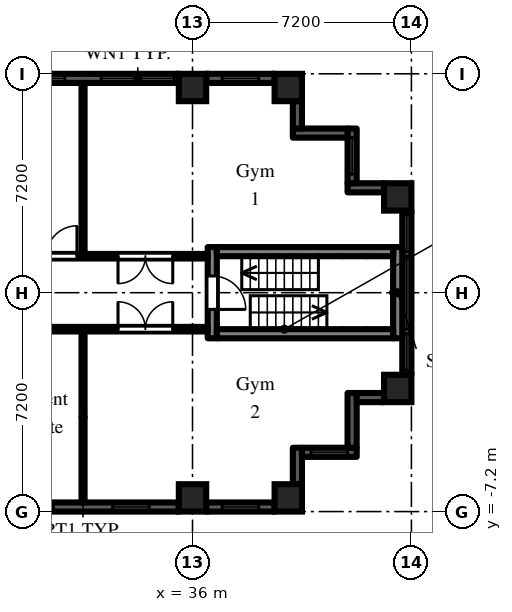
"""IFC4 building model, lengths in metres.
Left out: names, types, materials, properties, quantities, classifications, styles, units other than length and angle.
Written with IfcOpenShell. Run it as: python <this file> out.ifc"""

import sys

from ifc_helpers import new_model, si_unit, direction, frame, frame_2d, origin, origin_2d, place, context, subcontext, project, spatial, rectangle, extrude, element, fill, save


model = new_model("IFC4")
c1 = context("Model", 3, precision=1e-05, world=origin(), true_north=direction((0.0, 1.0)))
c2 = subcontext(c1, "Body", "Model", "MODEL_VIEW")
j1 = project(units=[si_unit("LENGTHUNIT", "METRE"), si_unit("PLANEANGLEUNIT", "RADIAN")], contexts=[c1])
p1 = place(None, origin())
s1 = spatial("IfcSite", under=j1, at=p1, CompositionType="ELEMENT")
p2 = place(p1, origin())
s2 = spatial("IfcBuilding", under=s1, at=p2, CompositionType="ELEMENT")
p3 = place(p2, frame((0.0, 0.0, 29.7)))
s3 = spatial("IfcBuildingStorey", under=s2, at=p3, CompositionType="ELEMENT", Elevation=29.7)
for number, where, z_axis, x_axis in (
    (1, (36.0, -6.75, 0.0), (0.0, 0.0, 1.0), (1.0, 0.0, 0.0)),
    (2, (36.0, 6.75, 0.0), (0.0, 0.0, 1.0), (1.0, 0.0, 0.0)),
    (3, (39.15, -6.75, 0.0), (0.0, 0.0, 1.0), (1.0, 0.0, 0.0)),
    (4, (39.15, 6.75, 0.0), (0.0, 0.0, 1.0), (1.0, 0.0, 0.0)),
    (5, (42.75, -3.15, 0.0), (0.0, 0.0, 1.0), (1.0, 0.0, 0.0)),
    (6, (42.75, 3.15, 0.0), (0.0, 0.0, 1.0), (1.0, 0.0, 0.0)),
):
    element("IfcColumn", number, at=place(p3, frame(where, z_axis=z_axis, x_axis=x_axis)), inside=s3, PredefinedType="COLUMN", context=c2, shape_type="SweptSolid", body=[
        extrude(rectangle(XDim=0.9, YDim=0.9, at=origin_2d()), origin(), (0.0, 0.0, 1.0), 3.0),
    ])
p4 = place(p3, frame((29.25, -7.05, 0.0), z_axis=(0.0, 0.0, 1.0), x_axis=(1.0, 0.0, 0.0)))
e7 = element("IfcWall", 7, at=p4, inside=s3, PredefinedType="SOLIDWALL", context=c2, shape_type="SweptSolid", body=[
    extrude(rectangle(XDim=6.3, YDim=0.3, at=frame_2d((3.15, 0.0))), origin(), (0.0, 0.0, 1.0), 2.1),
])
p5 = place(p4, frame((0.975, 0.0, 0.2)))
e8 = element("IfcOpeningElement", 8, at=p5, cuts=e7, PredefinedType="OPENING", context=c2, shape_type="SweptSolid", body=[
    extrude(rectangle(XDim=1.2, YDim=1.85, at=frame_2d((0.6, 0.925))), frame((0.0, 0.16, 0.0), z_axis=(0.0, -1.0, 0.0), x_axis=(1.0, 0.0, 0.0)), (0.0, 0.0, 1.0), 0.32),
])
p6 = place(p4, frame((4.125, 0.0, 0.2)))
e9 = element("IfcOpeningElement", 9, at=p6, cuts=e7, PredefinedType="OPENING", context=c2, shape_type="SweptSolid", body=[
    extrude(rectangle(XDim=1.2, YDim=1.85, at=frame_2d((0.6, 0.925))), frame((0.0, 0.16, 0.0), z_axis=(0.0, -1.0, 0.0), x_axis=(1.0, 0.0, 0.0)), (0.0, 0.0, 1.0), 0.32),
])
p7 = place(p3, frame((36.45, -7.05, 0.0), z_axis=(0.0, 0.0, 1.0), x_axis=(1.0, 0.0, 0.0)))
e10 = element("IfcWall", 10, at=p7, inside=s3, PredefinedType="SOLIDWALL", context=c2, shape_type="SweptSolid", body=[
    extrude(rectangle(XDim=2.25, YDim=0.3, at=frame_2d((1.125, 0.0))), origin(), (0.0, 0.0, 1.0), 2.1),
])
p8 = place(p7, frame((0.525, 0.0, 0.2)))
e11 = element("IfcOpeningElement", 11, at=p8, cuts=e10, PredefinedType="OPENING", context=c2, shape_type="SweptSolid", body=[
    extrude(rectangle(XDim=1.2, YDim=1.85, at=frame_2d((0.6, 0.925))), frame((0.0, 0.16, 0.0), z_axis=(0.0, -1.0, 0.0), x_axis=(1.0, 0.0, 0.0)), (0.0, 0.0, 1.0), 0.32),
])
p9 = place(p3, frame((39.45, -6.3, 0.0), z_axis=(0.0, 0.0, 1.0), x_axis=(0.0, 1.0, 0.0)))
e12 = element("IfcWall", 12, at=p9, inside=s3, PredefinedType="SOLIDWALL", context=c2, shape_type="SweptSolid", body=[
    extrude(rectangle(XDim=1.2, YDim=0.3, at=frame_2d((0.6, 0.0))), origin(), (0.0, 0.0, 1.0), 2.575),
])
p10 = place(p3, frame((39.6, -5.25, 0.0), z_axis=(0.0, 0.0, 1.0), x_axis=(1.0, 0.0, 0.0)))
e13 = element("IfcWall", 13, at=p10, inside=s3, PredefinedType="SOLIDWALL", context=c2, shape_type="SweptSolid", body=[
    extrude(rectangle(XDim=1.8, YDim=0.3, at=frame_2d((0.9, 0.0))), origin(), (0.0, 0.0, 1.0), 2.575),
])
p11 = place(p10, frame((0.3, 0.0, 0.2)))
e14 = element("IfcOpeningElement", 14, at=p11, cuts=e13, PredefinedType="OPENING", context=c2, shape_type="SweptSolid", body=[
    extrude(rectangle(XDim=1.2, YDim=1.85, at=frame_2d((0.6, 0.925))), frame((0.0, 0.16, 0.0), z_axis=(0.0, -1.0, 0.0), x_axis=(1.0, 0.0, 0.0)), (0.0, 0.0, 1.0), 0.32),
])
p12 = place(p3, frame((41.25, -5.1, 0.0), z_axis=(0.0, 0.0, 1.0), x_axis=(0.0, 1.0, 0.0)))
e15 = element("IfcWall", 15, at=p12, inside=s3, PredefinedType="SOLIDWALL", context=c2, shape_type="SweptSolid", body=[
    extrude(rectangle(XDim=1.8, YDim=0.3, at=frame_2d((0.9, 0.0))), origin(), (0.0, 0.0, 1.0), 2.575),
])
p13 = place(p3, frame((41.4, -3.45, 0.0), z_axis=(0.0, 0.0, 1.0), x_axis=(1.0, 0.0, 0.0)))
e16 = element("IfcWall", 16, at=p13, inside=s3, PredefinedType="SOLIDWALL", context=c2, shape_type="SweptSolid", body=[
    extrude(rectangle(XDim=0.9, YDim=0.3, at=frame_2d((0.45, 0.0))), origin(), (0.0, 0.0, 1.0), 2.575),
])
p14 = place(p3, frame((43.05, -2.7, 0.0), z_axis=(0.0, 0.0, 1.0), x_axis=(0.0, 1.0, 0.0)))
e17 = element("IfcWall", 17, at=p14, inside=s3, PredefinedType="SOLIDWALL", context=c2, shape_type="SweptSolid", body=[
    extrude(rectangle(XDim=5.4, YDim=0.3, at=frame_2d((2.7, 0.0))), origin(), (0.0, 0.0, 1.0), 2.1),
])
p15 = place(p14, frame((1.5, 0.0, 0.2)))
e18 = element("IfcOpeningElement", 18, at=p15, cuts=e17, PredefinedType="OPENING", context=c2, shape_type="SweptSolid", body=[
    extrude(rectangle(XDim=2.4, YDim=1.85, at=frame_2d((1.2, 0.925))), frame((0.0, 0.16, 0.0), z_axis=(0.0, -1.0, 0.0), x_axis=(1.0, 0.0, 0.0)), (0.0, 0.0, 1.0), 0.32),
])
p16 = place(p14, frame((0.15, 0.0, 0.2)))
e19 = element("IfcOpeningElement", 19, at=p16, cuts=e17, PredefinedType="OPENING", context=c2, shape_type="SweptSolid", body=[
    extrude(rectangle(XDim=1.2, YDim=1.85, at=frame_2d((0.6, 0.925))), frame((0.0, 0.16, 0.0), z_axis=(0.0, -1.0, 0.0), x_axis=(1.0, 0.0, 0.0)), (0.0, 0.0, 1.0), 0.32),
])
p17 = place(p14, frame((4.05, 0.0, 0.2)))
e20 = element("IfcOpeningElement", 20, at=p17, cuts=e17, PredefinedType="OPENING", context=c2, shape_type="SweptSolid", body=[
    extrude(rectangle(XDim=1.2, YDim=1.85, at=frame_2d((0.6, 0.925))), frame((0.0, 0.16, 0.0), z_axis=(0.0, -1.0, 0.0), x_axis=(1.0, 0.0, 0.0)), (0.0, 0.0, 1.0), 0.32),
])
p18 = place(p3, frame((42.3, 3.45, 0.0), z_axis=(0.0, 0.0, 1.0), x_axis=(-1.0, 0.0, 0.0)))
e21 = element("IfcWall", 21, at=p18, inside=s3, PredefinedType="SOLIDWALL", context=c2, shape_type="SweptSolid", body=[
    extrude(rectangle(XDim=1.2, YDim=0.3, at=frame_2d((0.6, 0.0))), origin(), (0.0, 0.0, 1.0), 2.575),
])
p19 = place(p3, frame((41.25, 3.6, 0.0), z_axis=(0.0, 0.0, 1.0), x_axis=(0.0, 1.0, 0.0)))
e22 = element("IfcWall", 22, at=p19, inside=s3, PredefinedType="SOLIDWALL", context=c2, shape_type="SweptSolid", body=[
    extrude(rectangle(XDim=1.8, YDim=0.3, at=frame_2d((0.9, 0.0))), origin(), (0.0, 0.0, 1.0), 2.575),
])
p20 = place(p19, frame((0.3, 0.0, 0.2)))
e23 = element("IfcOpeningElement", 23, at=p20, cuts=e22, PredefinedType="OPENING", context=c2, shape_type="SweptSolid", body=[
    extrude(rectangle(XDim=1.2, YDim=1.85, at=frame_2d((0.6, 0.925))), frame((0.0, 0.16, 0.0), z_axis=(0.0, -1.0, 0.0), x_axis=(1.0, 0.0, 0.0)), (0.0, 0.0, 1.0), 0.32),
])
p21 = place(p3, frame((41.1, 5.25, 0.0), z_axis=(0.0, 0.0, 1.0), x_axis=(-1.0, 0.0, 0.0)))
e24 = element("IfcWall", 24, at=p21, inside=s3, PredefinedType="SOLIDWALL", context=c2, shape_type="SweptSolid", body=[
    extrude(rectangle(XDim=1.8, YDim=0.3, at=frame_2d((0.9, 0.0))), origin(), (0.0, 0.0, 1.0), 2.575),
])
p22 = place(p3, frame((39.45, 5.4, 0.0), z_axis=(0.0, 0.0, 1.0), x_axis=(0.0, 1.0, 0.0)))
e25 = element("IfcWall", 25, at=p22, inside=s3, PredefinedType="SOLIDWALL", context=c2, shape_type="SweptSolid", body=[
    extrude(rectangle(XDim=0.9, YDim=0.3, at=frame_2d((0.45, 0.0))), origin(), (0.0, 0.0, 1.0), 2.575),
])
p23 = place(p3, frame((38.7, 7.05, 0.0), z_axis=(0.0, 0.0, 1.0), x_axis=(-1.0, 0.0, 0.0)))
e26 = element("IfcWall", 26, at=p23, inside=s3, PredefinedType="SOLIDWALL", context=c2, shape_type="SweptSolid", body=[
    extrude(rectangle(XDim=2.25, YDim=0.3, at=frame_2d((1.125, 0.0))), origin(), (0.0, 0.0, 1.0), 2.1),
])
p24 = place(p23, frame((0.525, 0.0, 0.2)))
e27 = element("IfcOpeningElement", 27, at=p24, cuts=e26, PredefinedType="OPENING", context=c2, shape_type="SweptSolid", body=[
    extrude(rectangle(XDim=1.2, YDim=1.85, at=frame_2d((0.6, 0.925))), frame((0.0, 0.16, 0.0), z_axis=(0.0, -1.0, 0.0), x_axis=(1.0, 0.0, 0.0)), (0.0, 0.0, 1.0), 0.32),
])
p25 = place(p3, frame((35.55, 7.05, 0.0), z_axis=(0.0, 0.0, 1.0), x_axis=(-1.0, 0.0, 0.0)))
e28 = element("IfcWall", 28, at=p25, inside=s3, PredefinedType="SOLIDWALL", context=c2, shape_type="SweptSolid", body=[
    extrude(rectangle(XDim=6.3, YDim=0.3, at=frame_2d((3.15, 0.0))), origin(), (0.0, 0.0, 1.0), 2.1),
])
p26 = place(p25, frame((0.15, 0.0, 0.2)))
e29 = element("IfcOpeningElement", 29, at=p26, cuts=e28, PredefinedType="OPENING", context=c2, shape_type="SweptSolid", body=[
    extrude(rectangle(XDim=2.4, YDim=1.85, at=frame_2d((1.2, 0.925))), frame((0.0, 0.16, 0.0), z_axis=(0.0, -1.0, 0.0), x_axis=(1.0, 0.0, 0.0)), (0.0, 0.0, 1.0), 0.32),
])
p27 = place(p25, frame((3.75, 0.0, 0.2)))
e30 = element("IfcOpeningElement", 30, at=p27, cuts=e28, PredefinedType="OPENING", context=c2, shape_type="SweptSolid", body=[
    extrude(rectangle(XDim=2.4, YDim=1.85, at=frame_2d((1.2, 0.925))), frame((0.0, 0.16, 0.0), z_axis=(0.0, -1.0, 0.0), x_axis=(1.0, 0.0, 0.0)), (0.0, 0.0, 1.0), 0.32),
])
p28 = place(p3, frame((36.65, -1.5, 0.0), z_axis=(0.0, 0.0, 1.0), x_axis=(0.0, 1.0, 0.0)))
e31 = element("IfcWall", 31, at=p28, inside=s3, PredefinedType="SHEAR", context=c2, shape_type="SweptSolid", body=[
    extrude(rectangle(XDim=3.0, YDim=0.3, at=frame_2d((1.5, 0.0))), origin(), (0.0, 0.0, 1.0), 2.575),
])
p29 = place(p28, frame((0.95, 0.0, 0.0)))
e32 = element("IfcOpeningElement", 32, at=p29, cuts=e31, PredefinedType="OPENING", context=c2, shape_type="SweptSolid", body=[
    extrude(rectangle(XDim=1.1, YDim=2.1, at=frame_2d((0.55, 1.05))), frame((0.0, 0.16, 0.0), z_axis=(0.0, -1.0, 0.0), x_axis=(1.0, 0.0, 0.0)), (0.0, 0.0, 1.0), 0.32),
])
p30 = place(p3, frame((42.75, -1.5, 0.0), z_axis=(0.0, 0.0, 1.0), x_axis=(0.0, 1.0, 0.0)))
e33 = element("IfcWall", 33, at=p30, inside=s3, PredefinedType="SHEAR", context=c2, shape_type="SweptSolid", body=[
    extrude(rectangle(XDim=3.0, YDim=0.3, at=frame_2d((1.5, 0.0))), origin(), (0.0, 0.0, 1.0), 2.575),
])
for number, where, z_axis, x_axis in (
    (34, (36.8, -1.35, 0.0), (0.0, 0.0, 1.0), (1.0, 0.0, 0.0)),
    (35, (36.8, 1.35, 0.0), (0.0, 0.0, 1.0), (1.0, 0.0, 0.0)),
):
    element("IfcWall", number, at=place(p3, frame(where, z_axis=z_axis, x_axis=x_axis)), inside=s3, PredefinedType="SHEAR", context=c2, shape_type="SweptSolid", body=[
        extrude(rectangle(XDim=5.8, YDim=0.3, at=frame_2d((2.9, 0.0))), origin(), (0.0, 0.0, 1.0), 2.575),
    ])
p31 = place(p3, frame((21.6, -1.2, 0.0), z_axis=(0.0, 0.0, 1.0), x_axis=(1.0, 0.0, 0.0)))
e36 = element("IfcWall", 36, at=p31, inside=s3, PredefinedType="PARTITIONING", context=c2, shape_type="SweptSolid", body=[
    extrude(rectangle(XDim=14.9, YDim=0.15, at=frame_2d((7.45, 0.0))), origin(), (0.0, 0.0, 1.0), 2.575),
])
p32 = place(p31, frame((1.35, 0.0, 0.0)))
e37 = element("IfcOpeningElement", 37, at=p32, cuts=e36, PredefinedType="OPENING", context=c2, shape_type="SweptSolid", body=[
    extrude(rectangle(XDim=0.9, YDim=2.1, at=frame_2d((0.45, 1.05))), frame((0.0, 0.085, 0.0), z_axis=(0.0, -1.0, 0.0), x_axis=(1.0, 0.0, 0.0)), (0.0, 0.0, 1.0), 0.17),
])
p33 = place(p31, frame((5.71, 0.0, 0.0)))
e38 = element("IfcOpeningElement", 38, at=p33, cuts=e36, PredefinedType="OPENING", context=c2, shape_type="SweptSolid", body=[
    extrude(rectangle(XDim=1.0, YDim=2.1, at=frame_2d((0.5, 1.05))), frame((0.0, 0.085, 0.0), z_axis=(0.0, -1.0, 0.0), x_axis=(1.0, 0.0, 0.0)), (0.0, 0.0, 1.0), 0.17),
])
p34 = place(p31, frame((11.95, 0.0, 0.0)))
e39 = element("IfcOpeningElement", 39, at=p34, cuts=e36, PredefinedType="OPENING", context=c2, shape_type="SweptSolid", body=[
    extrude(rectangle(XDim=1.8, YDim=2.1, at=frame_2d((0.9, 1.05))), frame((0.0, 0.085, 0.0), z_axis=(0.0, -1.0, 0.0), x_axis=(1.0, 0.0, 0.0)), (0.0, 0.0, 1.0), 0.17),
])
p35 = place(p3, frame((21.6, 1.2, 0.0), z_axis=(0.0, 0.0, 1.0), x_axis=(1.0, 0.0, 0.0)))
e40 = element("IfcWall", 40, at=p35, inside=s3, PredefinedType="PARTITIONING", context=c2, shape_type="SweptSolid", body=[
    extrude(rectangle(XDim=14.9, YDim=0.15, at=frame_2d((7.45, 0.0))), origin(), (0.0, 0.0, 1.0), 2.575),
])
p36 = place(p35, frame((6.0, 0.0, 0.0)))
e41 = element("IfcOpeningElement", 41, at=p36, cuts=e40, PredefinedType="OPENING", context=c2, shape_type="SweptSolid", body=[
    extrude(rectangle(XDim=1.0, YDim=2.1, at=frame_2d((0.5, 1.05))), frame((0.0, 0.085, 0.0), z_axis=(0.0, -1.0, 0.0), x_axis=(1.0, 0.0, 0.0)), (0.0, 0.0, 1.0), 0.17),
])
p37 = place(p35, frame((9.6, 0.0, 0.0)))
e42 = element("IfcOpeningElement", 42, at=p37, cuts=e40, PredefinedType="OPENING", context=c2, shape_type="SweptSolid", body=[
    extrude(rectangle(XDim=1.0, YDim=2.1, at=frame_2d((0.5, 1.05))), frame((0.0, 0.085, 0.0), z_axis=(0.0, -1.0, 0.0), x_axis=(1.0, 0.0, 0.0)), (0.0, 0.0, 1.0), 0.17),
])
p38 = place(p35, frame((11.95, 0.0, 0.0)))
e43 = element("IfcOpeningElement", 43, at=p38, cuts=e40, PredefinedType="OPENING", context=c2, shape_type="SweptSolid", body=[
    extrude(rectangle(XDim=1.8, YDim=2.1, at=frame_2d((0.9, 1.05))), frame((0.0, 0.085, 0.0), z_axis=(0.0, -1.0, 0.0), x_axis=(1.0, 0.0, 0.0)), (0.0, 0.0, 1.0), 0.17),
])
for number, where, z_axis, x_axis in (
    (44, (32.4, -6.9, 0.0), (0.0, 0.0, 1.0), (0.0, 1.0, 0.0)),
    (45, (32.4, 1.275, 0.0), (0.0, 0.0, 1.0), (0.0, 1.0, 0.0)),
):
    element("IfcWall", number, at=place(p3, frame(where, z_axis=z_axis, x_axis=x_axis)), inside=s3, PredefinedType="PARTITIONING", context=c2, shape_type="SweptSolid", body=[
        extrude(rectangle(XDim=5.625, YDim=0.1, at=frame_2d((2.812, 0.0))), origin(), (0.0, 0.0, 1.0), 2.575),
    ])
p39 = place(p5, origin())
e46 = element("IfcWindow", 46, at=p39, inside=s3, PartitioningType="SINGLE_PANEL", PredefinedType="WINDOW", context=c2, shape_type="SweptSolid", body=[
    extrude(rectangle(XDim=1.2, YDim=1.85, at=frame_2d((0.6, 0.925))), frame((0.0, 0.03, 0.0), z_axis=(0.0, -1.0, 0.0), x_axis=(1.0, 0.0, 0.0)), (0.0, 0.0, 1.0), 0.06),
])
fill(e8, e46)
p40 = place(p6, origin())
e47 = element("IfcWindow", 47, at=p40, inside=s3, PartitioningType="SINGLE_PANEL", PredefinedType="WINDOW", context=c2, shape_type="SweptSolid", body=[
    extrude(rectangle(XDim=1.2, YDim=1.85, at=frame_2d((0.6, 0.925))), frame((0.0, 0.03, 0.0), z_axis=(0.0, -1.0, 0.0), x_axis=(1.0, 0.0, 0.0)), (0.0, 0.0, 1.0), 0.06),
])
fill(e9, e47)
p41 = place(p8, origin())
e48 = element("IfcWindow", 48, at=p41, inside=s3, PartitioningType="SINGLE_PANEL", PredefinedType="WINDOW", context=c2, shape_type="SweptSolid", body=[
    extrude(rectangle(XDim=1.2, YDim=1.85, at=frame_2d((0.6, 0.925))), frame((0.0, 0.03, 0.0), z_axis=(0.0, -1.0, 0.0), x_axis=(1.0, 0.0, 0.0)), (0.0, 0.0, 1.0), 0.06),
])
fill(e11, e48)
p42 = place(p11, origin())
e49 = element("IfcWindow", 49, at=p42, inside=s3, PartitioningType="SINGLE_PANEL", PredefinedType="WINDOW", context=c2, shape_type="SweptSolid", body=[
    extrude(rectangle(XDim=1.2, YDim=1.85, at=frame_2d((0.6, 0.925))), frame((0.0, 0.03, 0.0), z_axis=(0.0, -1.0, 0.0), x_axis=(1.0, 0.0, 0.0)), (0.0, 0.0, 1.0), 0.06),
])
fill(e14, e49)
p43 = place(p15, origin())
e50 = element("IfcWindow", 50, at=p43, inside=s3, PartitioningType="SINGLE_PANEL", PredefinedType="WINDOW", context=c2, shape_type="SweptSolid", body=[
    extrude(rectangle(XDim=2.4, YDim=1.85, at=frame_2d((1.2, 0.925))), frame((0.0, 0.03, 0.0), z_axis=(0.0, -1.0, 0.0), x_axis=(1.0, 0.0, 0.0)), (0.0, 0.0, 1.0), 0.06),
])
fill(e18, e50)
p44 = place(p16, origin())
e51 = element("IfcWindow", 51, at=p44, inside=s3, PartitioningType="SINGLE_PANEL", PredefinedType="WINDOW", context=c2, shape_type="SweptSolid", body=[
    extrude(rectangle(XDim=1.2, YDim=1.85, at=frame_2d((0.6, 0.925))), frame((0.0, 0.03, 0.0), z_axis=(0.0, -1.0, 0.0), x_axis=(1.0, 0.0, 0.0)), (0.0, 0.0, 1.0), 0.06),
])
fill(e19, e51)
p45 = place(p17, origin())
e52 = element("IfcWindow", 52, at=p45, inside=s3, PartitioningType="SINGLE_PANEL", PredefinedType="WINDOW", context=c2, shape_type="SweptSolid", body=[
    extrude(rectangle(XDim=1.2, YDim=1.85, at=frame_2d((0.6, 0.925))), frame((0.0, 0.03, 0.0), z_axis=(0.0, -1.0, 0.0), x_axis=(1.0, 0.0, 0.0)), (0.0, 0.0, 1.0), 0.06),
])
fill(e20, e52)
p46 = place(p20, origin())
e53 = element("IfcWindow", 53, at=p46, inside=s3, PartitioningType="SINGLE_PANEL", PredefinedType="WINDOW", context=c2, shape_type="SweptSolid", body=[
    extrude(rectangle(XDim=1.2, YDim=1.85, at=frame_2d((0.6, 0.925))), frame((0.0, 0.03, 0.0), z_axis=(0.0, -1.0, 0.0), x_axis=(1.0, 0.0, 0.0)), (0.0, 0.0, 1.0), 0.06),
])
fill(e23, e53)
p47 = place(p24, origin())
e54 = element("IfcWindow", 54, at=p47, inside=s3, PartitioningType="SINGLE_PANEL", PredefinedType="WINDOW", context=c2, shape_type="SweptSolid", body=[
    extrude(rectangle(XDim=1.2, YDim=1.85, at=frame_2d((0.6, 0.925))), frame((0.0, 0.03, 0.0), z_axis=(0.0, -1.0, 0.0), x_axis=(1.0, 0.0, 0.0)), (0.0, 0.0, 1.0), 0.06),
])
fill(e27, e54)
p48 = place(p26, origin())
e55 = element("IfcWindow", 55, at=p48, inside=s3, PartitioningType="SINGLE_PANEL", PredefinedType="WINDOW", context=c2, shape_type="SweptSolid", body=[
    extrude(rectangle(XDim=2.4, YDim=1.85, at=frame_2d((1.2, 0.925))), frame((0.0, 0.03, 0.0), z_axis=(0.0, -1.0, 0.0), x_axis=(1.0, 0.0, 0.0)), (0.0, 0.0, 1.0), 0.06),
])
fill(e29, e55)
p49 = place(p27, origin())
e56 = element("IfcWindow", 56, at=p49, inside=s3, PartitioningType="SINGLE_PANEL", PredefinedType="WINDOW", context=c2, shape_type="SweptSolid", body=[
    extrude(rectangle(XDim=2.4, YDim=1.85, at=frame_2d((1.2, 0.925))), frame((0.0, 0.03, 0.0), z_axis=(0.0, -1.0, 0.0), x_axis=(1.0, 0.0, 0.0)), (0.0, 0.0, 1.0), 0.06),
])
fill(e30, e56)
p50 = place(p29, frame((1.1, 0.0, 0.0), z_axis=(0.0, 0.0, 1.0), x_axis=(-1.0, 0.0, 0.0)))
e57 = element("IfcDoor", 57, at=p50, inside=s3, OperationType="SINGLE_SWING_RIGHT", PredefinedType="DOOR", context=c2, shape_type="SweptSolid", body=[
    extrude(rectangle(XDim=1.1, YDim=2.1, at=frame_2d((0.55, 1.05))), frame((0.0, 0.025, 0.0), z_axis=(0.0, -1.0, 0.0), x_axis=(1.0, 0.0, 0.0)), (0.0, 0.0, 1.0), 0.05),
])
fill(e32, e57)
p51 = place(p37, origin())
e58 = element("IfcDoor", 58, at=p51, inside=s3, OperationType="SINGLE_SWING_RIGHT", PredefinedType="DOOR", context=c2, shape_type="SweptSolid", body=[
    extrude(rectangle(XDim=1.0, YDim=2.1, at=frame_2d((0.5, 1.05))), frame((0.0, 0.025, 0.0), z_axis=(0.0, -1.0, 0.0), x_axis=(1.0, 0.0, 0.0)), (0.0, 0.0, 1.0), 0.05),
])
fill(e42, e58)
p52 = place(p38, frame((1.8, 0.0, 0.0), z_axis=(0.0, 0.0, 1.0), x_axis=(-1.0, 0.0, 0.0)))
e59 = element("IfcDoor", 59, at=p52, inside=s3, OperationType="DOUBLE_DOOR_DOUBLE_SWING", PredefinedType="DOOR", context=c2, shape_type="SweptSolid", body=[
    extrude(rectangle(XDim=1.8, YDim=2.1, at=frame_2d((0.9, 1.05))), frame((0.0, 0.025, 0.0), z_axis=(0.0, -1.0, 0.0), x_axis=(1.0, 0.0, 0.0)), (0.0, 0.0, 1.0), 0.05),
])
fill(e43, e59)
p53 = place(p34, origin())
e60 = element("IfcDoor", 60, at=p53, inside=s3, OperationType="DOUBLE_DOOR_DOUBLE_SWING", PredefinedType="DOOR", context=c2, shape_type="SweptSolid", body=[
    extrude(rectangle(XDim=1.8, YDim=2.1, at=frame_2d((0.9, 1.05))), frame((0.0, 0.025, 0.0), z_axis=(0.0, -1.0, 0.0), x_axis=(1.0, 0.0, 0.0)), (0.0, 0.0, 1.0), 0.05),
])
fill(e39, e60)
save(model, sys.argv[1])
